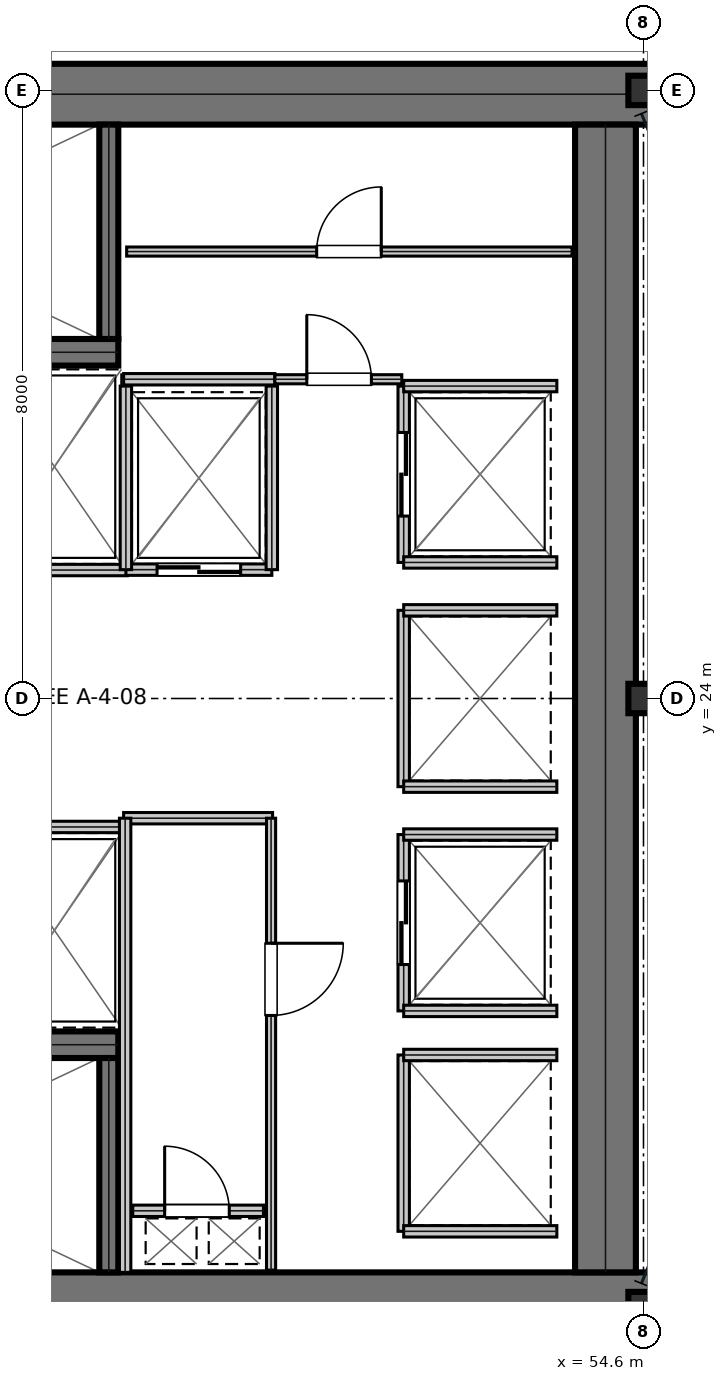
"""IFC4 building model, lengths in metres.
Left out: names, types, materials, properties, quantities, classifications, styles, units other than length and angle.
Written with IfcOpenShell. Run it as: python <this file> out.ifc"""

import sys

from ifc_helpers import new_model, si_unit, direction, frame, frame_2d, origin, origin_2d, place, context, subcontext, project, spatial, rectangle, i_section, extrude, element, fill, save


model = new_model("IFC4")
c1 = context("Model", 3, precision=1e-05, world=origin(), true_north=direction((0.0, 1.0)))
c2 = subcontext(c1, "Body", "Model", "MODEL_VIEW")
j1 = project(units=[si_unit("LENGTHUNIT", "METRE"), si_unit("PLANEANGLEUNIT", "RADIAN")], contexts=[c1])
p1 = place(None, origin())
s1 = spatial("IfcSite", under=j1, at=p1, CompositionType="ELEMENT")
p2 = place(p1, origin())
s2 = spatial("IfcBuilding", under=s1, at=p2, CompositionType="ELEMENT")
p3 = place(p2, frame((0.0, 0.0, 137.1)))
s3 = spatial("IfcBuildingStorey", under=s2, at=p3, CompositionType="ELEMENT", Elevation=137.1)
for number, where, z_axis, x_axis in (
    (1, (38.8, 31.95, 0.0), (0.0, 0.0, 1.0), (1.0, 0.0, 0.0)),
    (2, (38.8, 16.05, 0.0), (0.0, 0.0, 1.0), (1.0, 0.0, 0.0)),
):
    element("IfcWall", number, at=place(p3, frame(where, z_axis=z_axis, x_axis=x_axis)), inside=s3, PredefinedType="SHEAR", context=c2, shape_type="SweptSolid", body=[
        extrude(rectangle(XDim=16.0, YDim=0.8, at=frame_2d((8.0, 0.0))), origin(), (0.0, 0.0, 1.0), 3.81),
    ])
p4 = place(p3, frame((54.1, 16.45, 0.0), z_axis=(0.0, 0.0, 1.0), x_axis=(0.0, 1.0, 0.0)))
e3 = element("IfcWall", 3, at=p4, inside=s3, PredefinedType="SHEAR", context=c2, shape_type="SweptSolid", body=[
    extrude(rectangle(XDim=15.1, YDim=0.8, at=frame_2d((7.55, 0.0))), origin(), (0.0, 0.0, 1.0), 3.81),
])
p5 = place(p3, frame((39.98, 28.555, 0.0), z_axis=(0.0, 0.0, 1.0), x_axis=(1.0, 0.0, 0.0)))
e4 = element("IfcWall", 4, at=p5, inside=s3, PredefinedType="SHEAR", context=c2, shape_type="SweptSolid", body=[
    extrude(rectangle(XDim=7.71, YDim=0.35, at=frame_2d((3.855, 0.0))), origin(), (0.0, 0.0, 1.0), 3.81),
])
p6 = place(p5, frame((0.25, 0.0, 0.0)))
e5 = element("IfcOpeningElement", 5, at=p6, cuts=e4, PredefinedType="OPENING", context=c2, shape_type="SweptSolid", body=[
    extrude(rectangle(XDim=1.1, YDim=2.15, at=frame_2d((0.55, 1.075))), frame((0.0, 0.185, 0.0), z_axis=(0.0, -1.0, 0.0), x_axis=(1.0, 0.0, 0.0)), (0.0, 0.0, 1.0), 0.37),
])
p7 = place(p3, frame((39.98, 19.445, 0.0), z_axis=(0.0, 0.0, 1.0), x_axis=(1.0, 0.0, 0.0)))
e6 = element("IfcWall", 6, at=p7, inside=s3, PredefinedType="SHEAR", context=c2, shape_type="SweptSolid", body=[
    extrude(rectangle(XDim=7.71, YDim=0.35, at=frame_2d((3.855, 0.0))), origin(), (0.0, 0.0, 1.0), 3.81),
])
p8 = place(p7, frame((0.25, 0.0, 0.0)))
e7 = element("IfcOpeningElement", 7, at=p8, cuts=e6, PredefinedType="OPENING", context=c2, shape_type="SweptSolid", body=[
    extrude(rectangle(XDim=1.1, YDim=2.15, at=frame_2d((0.55, 1.075))), frame((0.0, 0.185, 0.0), z_axis=(0.0, -1.0, 0.0), x_axis=(1.0, 0.0, 0.0)), (0.0, 0.0, 1.0), 0.37),
])
for number, where, z_axis, x_axis in (
    (8, (47.565, 28.73, 0.0), (0.0, 0.0, 1.0), (0.0, 1.0, 0.0)),
    (9, (47.565, 16.45, 0.0), (0.0, 0.0, 1.0), (0.0, 1.0, 0.0)),
):
    element("IfcWall", number, at=place(p3, frame(where, z_axis=z_axis, x_axis=x_axis)), inside=s3, PredefinedType="SHEAR", context=c2, shape_type="SweptSolid", body=[
        extrude(rectangle(XDim=2.82, YDim=0.25, at=frame_2d((1.41, 0.0))), origin(), (0.0, 0.0, 1.0), 3.81),
    ])
for number, where, z_axis, x_axis in (
    (10, (54.6, 16.0, 0.0), (0.0, 0.0, 1.0), (1.0, 0.0, 0.0)),
    (11, (54.6, 24.0, 0.0), (0.0, 0.0, 1.0), (1.0, 0.0, 0.0)),
    (12, (54.6, 32.0, 0.0), (0.0, 0.0, 1.0), (1.0, 0.0, 0.0)),
):
    element("IfcColumn", number, at=place(p3, frame(where, z_axis=z_axis, x_axis=x_axis)), inside=s3, PredefinedType="COLUMN", context=c2, shape_type="SweptSolid", body=[
        extrude(i_section(OverallWidth=0.398, OverallDepth=0.387, WebThickness=0.021, FlangeThickness=0.033, at=origin_2d()), origin(), (0.0, 0.0, 1.0), 4.044),
    ])
for number, where, z_axis, x_axis in (
    (13, (45.895, 25.69, 0.0), (0.0, 0.0, 1.0), (1.0, 0.0, 0.0)),
    (14, (45.895, 22.31, 0.0), (0.0, 0.0, 1.0), (1.0, 0.0, 0.0)),
):
    element("IfcWall", number, at=place(p3, frame(where, z_axis=z_axis, x_axis=x_axis)), inside=s3, PredefinedType="PARTITIONING", context=c2, shape_type="SweptSolid", body=[
        extrude(rectangle(XDim=1.915, YDim=0.15, at=frame_2d((0.958, 0.0))), origin(), (0.0, 0.0, 1.0), 3.81),
    ])
p9 = place(p3, frame((47.79, 25.695, 0.0), z_axis=(0.0, 0.0, 1.0), x_axis=(1.0, 0.0, 0.0)))
e15 = element("IfcWall", 15, at=p9, inside=s3, PredefinedType="PARTITIONING", context=c2, shape_type="SweptSolid", body=[
    extrude(rectangle(XDim=1.92, YDim=0.15, at=frame_2d((0.96, 0.0))), origin(), (0.0, 0.0, 1.0), 3.81),
])
p10 = place(p9, frame((0.41, 0.0, 0.0)))
e16 = element("IfcOpeningElement", 16, at=p10, cuts=e15, PredefinedType="OPENING", context=c2, shape_type="SweptSolid", body=[
    extrude(rectangle(XDim=1.1, YDim=2.15, at=frame_2d((0.55, 1.075))), frame((0.0, 0.085, 0.0), z_axis=(0.0, -1.0, 0.0), x_axis=(1.0, 0.0, 0.0)), (0.0, 0.0, 1.0), 0.17),
])
for number, where, z_axis, x_axis in (
    (17, (47.79, 25.695, 0.0), (0.0, 0.0, 1.0), (0.0, 1.0, 0.0)),
    (18, (49.71, 25.695, 0.0), (0.0, 0.0, 1.0), (0.0, 1.0, 0.0)),
):
    element("IfcWall", number, at=place(p3, frame(where, z_axis=z_axis, x_axis=x_axis)), inside=s3, PredefinedType="PARTITIONING", context=c2, shape_type="SweptSolid", body=[
        extrude(rectangle(XDim=2.415, YDim=0.15, at=frame_2d((1.208, 0.0))), origin(), (0.0, 0.0, 1.0), 3.81),
    ])
p11 = place(p3, frame((51.445, 25.79, 0.0), z_axis=(0.0, 0.0, 1.0), x_axis=(0.0, 1.0, 0.0)))
e19 = element("IfcWall", 19, at=p11, inside=s3, PredefinedType="PARTITIONING", context=c2, shape_type="SweptSolid", body=[
    extrude(rectangle(XDim=2.32, YDim=0.15, at=frame_2d((1.16, 0.0))), origin(), (0.0, 0.0, 1.0), 3.81),
])
p12 = place(p11, frame((0.61, 0.0, 0.0)))
e20 = element("IfcOpeningElement", 20, at=p12, cuts=e19, PredefinedType="OPENING", context=c2, shape_type="SweptSolid", body=[
    extrude(rectangle(XDim=1.1, YDim=2.15, at=frame_2d((0.55, 1.075))), frame((0.0, 0.085, 0.0), z_axis=(0.0, -1.0, 0.0), x_axis=(1.0, 0.0, 0.0)), (0.0, 0.0, 1.0), 0.17),
])
for number, where, z_axis, x_axis in (
    (21, (51.445, 25.79, 0.0), (0.0, 0.0, 1.0), (1.0, 0.0, 0.0)),
    (22, (51.445, 28.11, 0.0), (0.0, 0.0, 1.0), (1.0, 0.0, 0.0)),
):
    element("IfcWall", number, at=place(p3, frame(where, z_axis=z_axis, x_axis=x_axis)), inside=s3, PredefinedType="PARTITIONING", context=c2, shape_type="SweptSolid", body=[
        extrude(rectangle(XDim=2.015, YDim=0.15, at=frame_2d((1.007, 0.0))), origin(), (0.0, 0.0, 1.0), 3.81),
    ])
p13 = place(p3, frame((51.445, 19.89, 0.0), z_axis=(0.0, 0.0, 1.0), x_axis=(0.0, 1.0, 0.0)))
e23 = element("IfcWall", 23, at=p13, inside=s3, PredefinedType="PARTITIONING", context=c2, shape_type="SweptSolid", body=[
    extrude(rectangle(XDim=2.32, YDim=0.15, at=frame_2d((1.16, 0.0))), origin(), (0.0, 0.0, 1.0), 3.81),
])
p14 = place(p13, frame((0.61, 0.0, 0.0)))
e24 = element("IfcOpeningElement", 24, at=p14, cuts=e23, PredefinedType="OPENING", context=c2, shape_type="SweptSolid", body=[
    extrude(rectangle(XDim=1.1, YDim=2.15, at=frame_2d((0.55, 1.075))), frame((0.0, 0.085, 0.0), z_axis=(0.0, -1.0, 0.0), x_axis=(1.0, 0.0, 0.0)), (0.0, 0.0, 1.0), 0.17),
])
for number, where, z_axis, x_axis in (
    (25, (51.445, 19.89, 0.0), (0.0, 0.0, 1.0), (1.0, 0.0, 0.0)),
    (26, (51.445, 22.21, 0.0), (0.0, 0.0, 1.0), (1.0, 0.0, 0.0)),
):
    element("IfcWall", number, at=place(p3, frame(where, z_axis=z_axis, x_axis=x_axis)), inside=s3, PredefinedType="PARTITIONING", context=c2, shape_type="SweptSolid", body=[
        extrude(rectangle(XDim=2.015, YDim=0.15, at=frame_2d((1.007, 0.0))), origin(), (0.0, 0.0, 1.0), 3.81),
    ])
p15 = place(p3, frame((51.445, 22.84, 0.0), z_axis=(0.0, 0.0, 1.0), x_axis=(0.0, 1.0, 0.0)))
e27 = element("IfcWall", 27, at=p15, inside=s3, PredefinedType="PARTITIONING", context=c2, shape_type="SweptSolid", body=[
    extrude(rectangle(XDim=2.32, YDim=0.15, at=frame_2d((1.16, 0.0))), origin(), (0.0, 0.0, 1.0), 3.81),
])
for number, where, z_axis, x_axis in (
    (28, (51.445, 22.84, 0.0), (0.0, 0.0, 1.0), (1.0, 0.0, 0.0)),
    (29, (51.445, 25.16, 0.0), (0.0, 0.0, 1.0), (1.0, 0.0, 0.0)),
):
    element("IfcWall", number, at=place(p3, frame(where, z_axis=z_axis, x_axis=x_axis)), inside=s3, PredefinedType="PARTITIONING", context=c2, shape_type="SweptSolid", body=[
        extrude(rectangle(XDim=2.015, YDim=0.15, at=frame_2d((1.007, 0.0))), origin(), (0.0, 0.0, 1.0), 3.81),
    ])
p16 = place(p3, frame((51.445, 16.99, 0.0), z_axis=(0.0, 0.0, 1.0), x_axis=(0.0, 1.0, 0.0)))
e30 = element("IfcWall", 30, at=p16, inside=s3, PredefinedType="PARTITIONING", context=c2, shape_type="SweptSolid", body=[
    extrude(rectangle(XDim=2.32, YDim=0.15, at=frame_2d((1.16, 0.0))), origin(), (0.0, 0.0, 1.0), 3.81),
])
for number, where, z_axis, x_axis in (
    (31, (51.445, 16.99, 0.0), (0.0, 0.0, 1.0), (1.0, 0.0, 0.0)),
    (32, (51.445, 19.31, 0.0), (0.0, 0.0, 1.0), (1.0, 0.0, 0.0)),
):
    element("IfcWall", number, at=place(p3, frame(where, z_axis=z_axis, x_axis=x_axis)), inside=s3, PredefinedType="PARTITIONING", context=c2, shape_type="SweptSolid", body=[
        extrude(rectangle(XDim=2.015, YDim=0.15, at=frame_2d((1.007, 0.0))), origin(), (0.0, 0.0, 1.0), 3.81),
    ])
p17 = place(p3, frame((47.88, 17.26, 0.0), z_axis=(0.0, 0.0, 1.0), x_axis=(1.0, 0.0, 0.0)))
e33 = element("IfcWall", 33, at=p17, inside=s3, PredefinedType="PARTITIONING", context=c2, shape_type="SweptSolid", body=[
    extrude(rectangle(XDim=1.72, YDim=0.15, at=frame_2d((0.86, 0.0))), origin(), (0.0, 0.0, 1.0), 3.81),
])
p18 = place(p17, frame((0.42, 0.0, 0.0)))
e34 = element("IfcOpeningElement", 34, at=p18, cuts=e33, PredefinedType="OPENING", context=c2, shape_type="SweptSolid", body=[
    extrude(rectangle(XDim=0.85, YDim=2.15, at=frame_2d((0.425, 1.075))), frame((0.0, 0.085, 0.0), z_axis=(0.0, -1.0, 0.0), x_axis=(1.0, 0.0, 0.0)), (0.0, 0.0, 1.0), 0.17),
])
p19 = place(p3, frame((47.76, 22.425, 0.0), z_axis=(0.0, 0.0, 1.0), x_axis=(1.0, 0.0, 0.0)))
e35 = element("IfcWall", 35, at=p19, inside=s3, PredefinedType="PARTITIONING", context=c2, shape_type="SweptSolid", body=[
    extrude(rectangle(XDim=1.96, YDim=0.15, at=frame_2d((0.98, 0.0))), origin(), (0.0, 0.0, 1.0), 3.81),
])
p20 = place(p3, frame((47.78, 16.45, 0.0), z_axis=(0.0, 0.0, 1.0), x_axis=(0.0, 1.0, 0.0)))
e36 = element("IfcWall", 36, at=p20, inside=s3, PredefinedType="PARTITIONING", context=c2, shape_type="SweptSolid", body=[
    extrude(rectangle(XDim=5.975, YDim=0.15, at=frame_2d((2.988, 0.0))), origin(), (0.0, 0.0, 1.0), 3.81),
])
p21 = place(p3, frame((49.7, 16.48, 0.0), z_axis=(0.0, 0.0, 1.0), x_axis=(0.0, 1.0, 0.0)))
e37 = element("IfcWall", 37, at=p21, inside=s3, PredefinedType="PARTITIONING", context=c2, shape_type="SweptSolid", body=[
    extrude(rectangle(XDim=5.945, YDim=0.12, at=frame_2d((2.973, 0.0))), origin(), (0.0, 0.0, 1.0), 3.81),
])
p22 = place(p21, frame((3.35, 0.0, 0.0)))
e38 = element("IfcOpeningElement", 38, at=p22, cuts=e37, PredefinedType="OPENING", context=c2, shape_type="SweptSolid", body=[
    extrude(rectangle(XDim=0.95, YDim=2.15, at=frame_2d((0.475, 1.075))), frame((0.0, 0.07, 0.0), z_axis=(0.0, -1.0, 0.0), x_axis=(1.0, 0.0, 0.0)), (0.0, 0.0, 1.0), 0.14),
])
p23 = place(p3, frame((47.76, 28.2, 0.0), z_axis=(0.0, 0.0, 1.0), x_axis=(1.0, 0.0, 0.0)))
e39 = element("IfcWall", 39, at=p23, inside=s3, PredefinedType="PARTITIONING", context=c2, shape_type="SweptSolid", body=[
    extrude(rectangle(XDim=1.99, YDim=0.15, at=frame_2d((0.995, 0.0))), origin(), (0.0, 0.0, 1.0), 3.81),
])
p24 = place(p3, frame((49.75, 28.2, 0.0), z_axis=(0.0, 0.0, 1.0), x_axis=(1.0, 0.0, 0.0)))
e40 = element("IfcWall", 40, at=p24, inside=s3, PredefinedType="PARTITIONING", context=c2, shape_type="SweptSolid", body=[
    extrude(rectangle(XDim=1.67, YDim=0.12, at=frame_2d((0.835, 0.0))), origin(), (0.0, 0.0, 1.0), 3.81),
])
p25 = place(p24, frame((0.42, 0.0, 0.0)))
e41 = element("IfcOpeningElement", 41, at=p25, cuts=e40, PredefinedType="OPENING", context=c2, shape_type="SweptSolid", body=[
    extrude(rectangle(XDim=0.85, YDim=2.15, at=frame_2d((0.425, 1.075))), frame((0.0, 0.07, 0.0), z_axis=(0.0, -1.0, 0.0), x_axis=(1.0, 0.0, 0.0)), (0.0, 0.0, 1.0), 0.14),
])
p26 = place(p3, frame((47.8, 29.88, 0.0), z_axis=(0.0, 0.0, 1.0), x_axis=(1.0, 0.0, 0.0)))
e42 = element("IfcWall", 42, at=p26, inside=s3, PredefinedType="PARTITIONING", context=c2, shape_type="SweptSolid", body=[
    extrude(rectangle(XDim=5.86, YDim=0.12, at=frame_2d((2.93, 0.0))), origin(), (0.0, 0.0, 1.0), 3.81),
])
p27 = place(p26, frame((2.5, 0.0, 0.0)))
e43 = element("IfcOpeningElement", 43, at=p27, cuts=e42, PredefinedType="OPENING", context=c2, shape_type="SweptSolid", body=[
    extrude(rectangle(XDim=0.85, YDim=2.15, at=frame_2d((0.425, 1.075))), frame((0.0, 0.07, 0.0), z_axis=(0.0, -1.0, 0.0), x_axis=(1.0, 0.0, 0.0)), (0.0, 0.0, 1.0), 0.14),
])
p28 = place(p10, frame((1.1, 0.0, 0.0), z_axis=(0.0, 0.0, 1.0), x_axis=(-1.0, 0.0, 0.0)))
e44 = element("IfcDoor", 44, at=p28, inside=s3, OperationType="DOUBLE_DOOR_SLIDING", PredefinedType="DOOR", context=c2, shape_type="SweptSolid", body=[
    extrude(rectangle(XDim=1.1, YDim=2.15, at=frame_2d((0.55, 1.075))), frame((0.0, 0.025, 0.0), z_axis=(0.0, -1.0, 0.0), x_axis=(1.0, 0.0, 0.0)), (0.0, 0.0, 1.0), 0.05),
])
fill(e16, e44)
p29 = place(p12, frame((1.1, 0.0, 0.0), z_axis=(0.0, 0.0, 1.0), x_axis=(-1.0, 0.0, 0.0)))
e45 = element("IfcDoor", 45, at=p29, inside=s3, OperationType="DOUBLE_DOOR_SLIDING", PredefinedType="DOOR", context=c2, shape_type="SweptSolid", body=[
    extrude(rectangle(XDim=1.1, YDim=2.15, at=frame_2d((0.55, 1.075))), frame((0.0, 0.025, 0.0), z_axis=(0.0, -1.0, 0.0), x_axis=(1.0, 0.0, 0.0)), (0.0, 0.0, 1.0), 0.05),
])
fill(e20, e45)
p30 = place(p14, frame((1.1, 0.0, 0.0), z_axis=(0.0, 0.0, 1.0), x_axis=(-1.0, 0.0, 0.0)))
e46 = element("IfcDoor", 46, at=p30, inside=s3, OperationType="DOUBLE_DOOR_SLIDING", PredefinedType="DOOR", context=c2, shape_type="SweptSolid", body=[
    extrude(rectangle(XDim=1.1, YDim=2.15, at=frame_2d((0.55, 1.075))), frame((0.0, 0.025, 0.0), z_axis=(0.0, -1.0, 0.0), x_axis=(1.0, 0.0, 0.0)), (0.0, 0.0, 1.0), 0.05),
])
fill(e24, e46)
p31 = place(p18, origin())
e47 = element("IfcDoor", 47, at=p31, inside=s3, OperationType="SINGLE_SWING_LEFT", PredefinedType="TRAPDOOR", context=c2, shape_type="SweptSolid", body=[
    extrude(rectangle(XDim=0.85, YDim=2.15, at=frame_2d((0.425, 1.075))), frame((0.0, 0.025, 0.0), z_axis=(0.0, -1.0, 0.0), x_axis=(1.0, 0.0, 0.0)), (0.0, 0.0, 1.0), 0.05),
])
fill(e34, e47)
p32 = place(p22, frame((0.95, 0.0, 0.0), z_axis=(0.0, 0.0, 1.0), x_axis=(-1.0, 0.0, 0.0)))
e48 = element("IfcDoor", 48, at=p32, inside=s3, OperationType="SINGLE_SWING_LEFT", PredefinedType="DOOR", context=c2, shape_type="SweptSolid", body=[
    extrude(rectangle(XDim=0.95, YDim=2.15, at=frame_2d((0.475, 1.075))), frame((0.0, 0.025, 0.0), z_axis=(0.0, -1.0, 0.0), x_axis=(1.0, 0.0, 0.0)), (0.0, 0.0, 1.0), 0.05),
])
fill(e38, e48)
p33 = place(p25, origin())
e49 = element("IfcDoor", 49, at=p33, inside=s3, OperationType="SINGLE_SWING_LEFT", PredefinedType="DOOR", context=c2, shape_type="SweptSolid", body=[
    extrude(rectangle(XDim=0.85, YDim=2.15, at=frame_2d((0.425, 1.075))), frame((0.0, 0.025, 0.0), z_axis=(0.0, -1.0, 0.0), x_axis=(1.0, 0.0, 0.0)), (0.0, 0.0, 1.0), 0.05),
])
fill(e41, e49)
p34 = place(p27, origin())
e50 = element("IfcDoor", 50, at=p34, inside=s3, OperationType="SINGLE_SWING_RIGHT", PredefinedType="DOOR", context=c2, shape_type="SweptSolid", body=[
    extrude(rectangle(XDim=0.85, YDim=2.15, at=frame_2d((0.425, 1.075))), frame((0.0, 0.025, 0.0), z_axis=(0.0, -1.0, 0.0), x_axis=(1.0, 0.0, 0.0)), (0.0, 0.0, 1.0), 0.05),
])
fill(e43, e50)
save(model, sys.argv[1])
